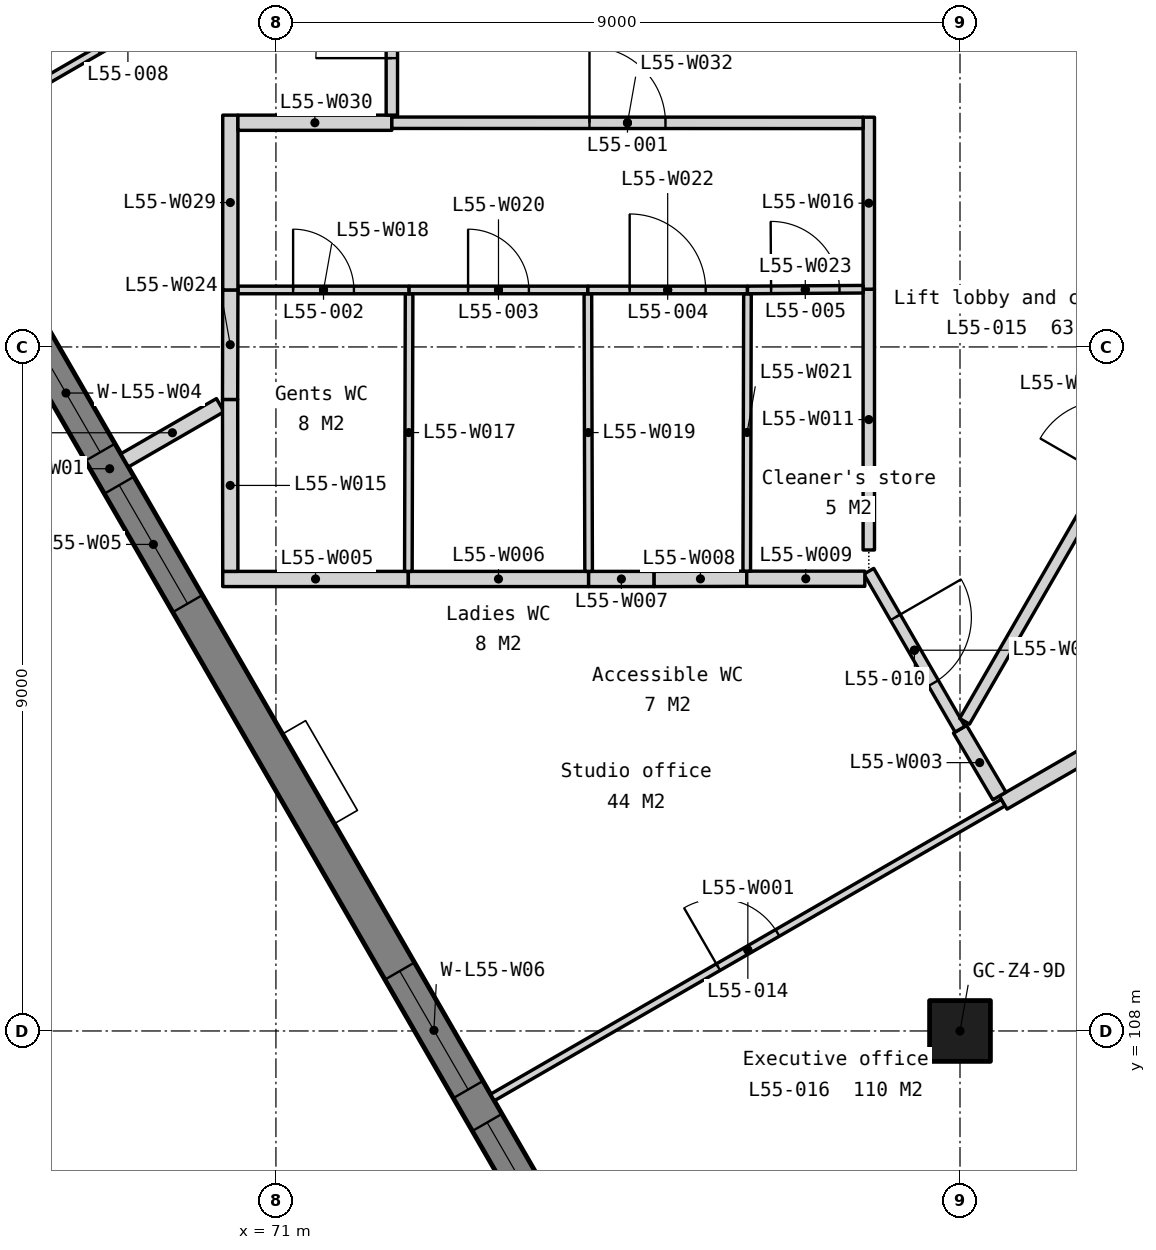
"""IFC4 building model, lengths in metres.
Left out: names, types, materials, properties, quantities, classifications, styles, units other than length and angle.
Written with IfcOpenShell. Run it as: python <this file> out.ifc"""

import sys

from ifc_helpers import new_model, si_unit, direction, frame, frame_2d, origin, origin_2d, place, context, subcontext, project, spatial, polyline, rectangle, outline, extrude, element, fill, save


model = new_model("IFC4")
c1 = context("Model", 3, precision=1e-05, world=origin(), true_north=direction((0.0, 1.0)))
c2 = subcontext(c1, "Body", "Model", "MODEL_VIEW")
j1 = project(units=[si_unit("LENGTHUNIT", "METRE"), si_unit("PLANEANGLEUNIT", "RADIAN")], contexts=[c1])
p1 = place(None, origin())
s1 = spatial("IfcSite", under=j1, at=p1, CompositionType="ELEMENT")
p2 = place(p1, origin())
s2 = spatial("IfcBuilding", under=s1, at=p2, CompositionType="ELEMENT")
p3 = place(p2, frame((0.0, 0.0, 219.2)))
s3 = spatial("IfcBuildingStorey", under=s2, at=p3, CompositionType="ELEMENT", Elevation=219.2)
p4 = place(p3, frame((80.0, 108.0, 0.0), z_axis=(0.0, 0.0, 1.0), x_axis=(1.0, 0.0, 0.0)))
e1 = element("IfcColumn", 1, at=p4, inside=s3, PredefinedType="COLUMN", context=c2, shape_type="SweptSolid", body=[
    extrude(rectangle(XDim=0.8, YDim=0.8, at=origin_2d()), origin(), (0.0, 0.0, 1.0), 3.9),
])
p5 = place(p3, frame((59.13, 132.168, -0.15), z_axis=(0.0, 0.0, 1.0), x_axis=(0.500002199942, -0.866024133644, 0.0)))
e2 = element("IfcWall", 2, at=p5, inside=s3, PredefinedType="SOLIDWALL", context=c2, shape_type="SweptSolid", body=[
    extrude(outline(polyline([(38.729, 0.0), (38.729, 3.9), (0.0, 3.9), (0.0, 0.0), (38.729, 0.0)])), frame((0.0, 0.225, 0.0), z_axis=(0.0, -1.0, 0.0), x_axis=(1.0, 0.0, 0.0)), (0.0, 0.0, 1.0), 0.45),
])
p6 = place(p5, frame((0.807, 0.0, 0.95)))
e3 = element("IfcOpeningElement", 3, at=p6, cuts=e2, PredefinedType="OPENING", context=c2, shape_type="SweptSolid", body=[
    extrude(rectangle(XDim=1.2, YDim=2.2, at=frame_2d((0.6, 1.1))), frame((0.0, 0.235, 0.0), z_axis=(0.0, -1.0, 0.0), x_axis=(1.0, 0.0, 0.0)), (0.0, 0.0, 1.0), 0.47),
])
p7 = place(p5, frame((7.632, 0.0, 0.95)))
e4 = element("IfcOpeningElement", 4, at=p7, cuts=e2, PredefinedType="OPENING", context=c2, shape_type="SweptSolid", body=[
    extrude(rectangle(XDim=1.8, YDim=2.2, at=frame_2d((0.9, 1.1))), frame((0.0, 0.235, 0.0), z_axis=(0.0, -1.0, 0.0), x_axis=(1.0, 0.0, 0.0)), (0.0, 0.0, 1.0), 0.47),
])
p8 = place(p5, frame((9.932, 0.0, 0.95)))
e5 = element("IfcOpeningElement", 5, at=p8, cuts=e2, PredefinedType="OPENING", context=c2, shape_type="SweptSolid", body=[
    extrude(rectangle(XDim=1.8, YDim=2.2, at=frame_2d((0.9, 1.1))), frame((0.0, 0.235, 0.0), z_axis=(0.0, -1.0, 0.0), x_axis=(1.0, 0.0, 0.0)), (0.0, 0.0, 1.0), 0.47),
])
p9 = place(p5, frame((17.315, 0.0, 0.95)))
e6 = element("IfcOpeningElement", 6, at=p9, cuts=e2, PredefinedType="OPENING", context=c2, shape_type="SweptSolid", body=[
    extrude(rectangle(XDim=1.8, YDim=2.2, at=frame_2d((0.9, 1.1))), frame((0.0, 0.235, 0.0), z_axis=(0.0, -1.0, 0.0), x_axis=(1.0, 0.0, 0.0)), (0.0, 0.0, 1.0), 0.47),
])
p10 = place(p5, frame((19.615, 0.0, 0.95)))
e7 = element("IfcOpeningElement", 7, at=p10, cuts=e2, PredefinedType="OPENING", context=c2, shape_type="SweptSolid", body=[
    extrude(rectangle(XDim=1.8, YDim=2.2, at=frame_2d((0.9, 1.1))), frame((0.0, 0.235, 0.0), z_axis=(0.0, -1.0, 0.0), x_axis=(1.0, 0.0, 0.0)), (0.0, 0.0, 1.0), 0.47),
])
p11 = place(p5, frame((26.997, 0.0, 0.95)))
e8 = element("IfcOpeningElement", 8, at=p11, cuts=e2, PredefinedType="OPENING", context=c2, shape_type="SweptSolid", body=[
    extrude(rectangle(XDim=1.8, YDim=2.2, at=frame_2d((0.9, 1.1))), frame((0.0, 0.235, 0.0), z_axis=(0.0, -1.0, 0.0), x_axis=(1.0, 0.0, 0.0)), (0.0, 0.0, 1.0), 0.47),
])
p12 = place(p5, frame((29.297, 0.0, 0.95)))
e9 = element("IfcOpeningElement", 9, at=p12, cuts=e2, PredefinedType="OPENING", context=c2, shape_type="SweptSolid", body=[
    extrude(rectangle(XDim=1.8, YDim=2.2, at=frame_2d((0.9, 1.1))), frame((0.0, 0.235, 0.0), z_axis=(0.0, -1.0, 0.0), x_axis=(1.0, 0.0, 0.0)), (0.0, 0.0, 1.0), 0.47),
])
p13 = place(p5, frame((36.722, 0.0, 0.95)))
e10 = element("IfcOpeningElement", 10, at=p13, cuts=e2, PredefinedType="OPENING", context=c2, shape_type="SweptSolid", body=[
    extrude(rectangle(XDim=1.2, YDim=2.2, at=frame_2d((0.6, 1.1))), frame((0.0, 0.235, 0.0), z_axis=(0.0, -1.0, 0.0), x_axis=(1.0, 0.0, 0.0)), (0.0, 0.0, 1.0), 0.47),
])
p14 = place(p3, frame((73.849, 107.125, 0.0), z_axis=(0.0, 0.0, 1.0), x_axis=(0.866027358884, 0.499996613652, 0.0)))
e11 = element("IfcWall", 11, at=p14, inside=s3, PredefinedType="PARTITIONING", context=c2, shape_type="SweptSolid", body=[
    extrude(rectangle(XDim=7.76, YDim=0.1, at=frame_2d((3.88, 0.0))), origin(), (0.0, 0.0, 1.0), 3.75),
])
p15 = place(p14, frame((3.43, 0.0, 0.0)))
e12 = element("IfcOpeningElement", 12, at=p15, cuts=e11, PredefinedType="OPENING", context=c2, shape_type="SweptSolid", body=[
    extrude(rectangle(XDim=0.9, YDim=2.1, at=frame_2d((0.45, 1.05))), frame((0.0, 0.06, 0.0), z_axis=(0.0, -1.0, 0.0), x_axis=(1.0, 0.0, 0.0)), (0.0, 0.0, 1.0), 0.12),
])
p16 = place(p3, frame((80.569, 111.005, 0.0), z_axis=(0.0, 0.0, 1.0), x_axis=(0.866025130863, 0.500000472714, 0.0)))
e13 = element("IfcWall", 13, at=p16, inside=s3, PredefinedType="PARTITIONING", context=c2, shape_type="SweptSolid", body=[
    extrude(rectangle(XDim=10.363, YDim=0.2, at=frame_2d((5.182, 0.0))), origin(), (0.0, 0.0, 1.0), 3.75),
])
p17 = place(p3, frame((80.0, 111.97, 0.0), z_axis=(0.0, 0.0, 1.0), x_axis=(0.507689136561, -0.861540330233, 0.0)))
e14 = element("IfcWall", 14, at=p17, inside=s3, PredefinedType="PARTITIONING", context=c2, shape_type="SweptSolid", body=[
    extrude(rectangle(XDim=1.021, YDim=0.2, at=frame_2d((0.51, 0.0))), origin(), (0.0, 0.0, 1.0), 3.75),
])
p18 = place(p3, frame((78.8, 114.049, 0.0), z_axis=(0.0, 0.0, 1.0), x_axis=(0.500001309137, -0.866024647952, 0.0)))
e15 = element("IfcWall", 15, at=p18, inside=s3, PredefinedType="PARTITIONING", context=c2, shape_type="SweptSolid", body=[
    extrude(rectangle(XDim=2.4, YDim=0.15, at=frame_2d((1.2, 0.0))), origin(), (0.0, 0.0, 1.0), 3.75),
])
p19 = place(p18, frame((0.7, 0.0, 0.0)))
e16 = element("IfcOpeningElement", 16, at=p19, cuts=e15, PredefinedType="OPENING", context=c2, shape_type="SweptSolid", body=[
    extrude(rectangle(XDim=1.0, YDim=2.1, at=frame_2d((0.5, 1.05))), frame((0.0, 0.085, 0.0), z_axis=(0.0, -1.0, 0.0), x_axis=(1.0, 0.0, 0.0)), (0.0, 0.0, 1.0), 0.17),
])
p20 = place(p3, frame((70.3, 113.947, 0.0), z_axis=(0.0, 0.0, 1.0), x_axis=(1.0, 0.0, 0.0)))
e17 = element("IfcWall", 17, at=p20, inside=s3, PredefinedType="PARTITIONING", context=c2, shape_type="SweptSolid", body=[
    extrude(rectangle(XDim=2.442, YDim=0.2, at=frame_2d((1.221, 0.0))), origin(), (0.0, 0.0, 1.0), 3.75),
])
p21 = place(p3, frame((72.742, 113.947, 0.0), z_axis=(0.0, 0.0, 1.0), x_axis=(1.0, 0.0, 0.0)))
e18 = element("IfcWall", 18, at=p21, inside=s3, PredefinedType="PARTITIONING", context=c2, shape_type="SweptSolid", body=[
    extrude(rectangle(XDim=2.372, YDim=0.2, at=frame_2d((1.186, 0.0))), origin(), (0.0, 0.0, 1.0), 3.75),
])
p22 = place(p3, frame((75.114, 113.947, 0.0), z_axis=(0.0, 0.0, 1.0), x_axis=(1.0, 0.0, 0.0)))
e19 = element("IfcWall", 19, at=p22, inside=s3, PredefinedType="PARTITIONING", context=c2, shape_type="SweptSolid", body=[
    extrude(rectangle(XDim=0.862, YDim=0.2, at=frame_2d((0.431, 0.0))), origin(), (0.0, 0.0, 1.0), 3.75),
])
p23 = place(p3, frame((75.976, 113.947, 0.0), z_axis=(0.0, 0.0, 1.0), x_axis=(0.999997107299, 0.002405284684, 0.0)))
e20 = element("IfcWall", 20, at=p23, inside=s3, PredefinedType="PARTITIONING", context=c2, shape_type="SweptSolid", body=[
    extrude(rectangle(XDim=1.218, YDim=0.2, at=frame_2d((0.609, 0.0))), origin(), (0.0, 0.0, 1.0), 3.75),
])
p24 = place(p3, frame((77.194, 113.95, 0.0), z_axis=(0.0, 0.0, 1.0), x_axis=(1.0, 0.0, 0.0)))
e21 = element("IfcWall", 21, at=p24, inside=s3, PredefinedType="PARTITIONING", context=c2, shape_type="SweptSolid", body=[
    extrude(rectangle(XDim=1.554, YDim=0.2, at=frame_2d((0.777, 0.0))), origin(), (0.0, 0.0, 1.0), 3.75),
])
p25 = place(p3, frame((78.8, 114.329, 0.0), z_axis=(0.0, 0.0, 1.0), x_axis=(0.0, 1.0, 0.0)))
e22 = element("IfcWall", 22, at=p25, inside=s3, PredefinedType="PARTITIONING", context=c2, shape_type="SweptSolid", body=[
    extrude(rectangle(XDim=3.431, YDim=0.15, at=frame_2d((1.716, 0.0))), origin(), (0.0, 0.0, 1.0), 3.75),
])
p26 = place(p3, frame((69.009, 115.508, 0.0), z_axis=(0.0, 0.0, 1.0), x_axis=(0.865958882005, 0.500115201406, 0.0)))
e23 = element("IfcWall", 23, at=p26, inside=s3, PredefinedType="PARTITIONING", context=c2, shape_type="SweptSolid", body=[
    extrude(rectangle(XDim=1.453, YDim=0.2, at=frame_2d((0.727, 0.0))), origin(), (0.0, 0.0, 1.0), 3.75),
])
p27 = place(p3, frame((70.4, 114.047, 0.0), z_axis=(0.0, 0.0, 1.0), x_axis=(-0.001295195892, 0.999999161233, 0.0)))
e24 = element("IfcWall", 24, at=p27, inside=s3, PredefinedType="PARTITIONING", context=c2, shape_type="SweptSolid", body=[
    extrude(rectangle(XDim=2.262, YDim=0.2, at=frame_2d((1.131, 0.0))), origin(), (0.0, 0.0, 1.0), 3.75),
])
p28 = place(p3, frame((78.8, 117.76, 0.0), z_axis=(0.0, 0.0, 1.0), x_axis=(0.0, 1.0, 0.0)))
e25 = element("IfcWall", 25, at=p28, inside=s3, PredefinedType="PARTITIONING", context=c2, shape_type="SweptSolid", body=[
    extrude(rectangle(XDim=2.263, YDim=0.15, at=frame_2d((1.131, 0.0))), origin(), (0.0, 0.0, 1.0), 3.75),
])
p29 = place(p3, frame((72.742, 114.047, 0.0), z_axis=(0.0, 0.0, 1.0), x_axis=(0.002673429826, 0.99999642638, 0.0)))
e26 = element("IfcWall", 26, at=p29, inside=s3, PredefinedType="PARTITIONING", context=c2, shape_type="SweptSolid", body=[
    extrude(rectangle(XDim=3.653, YDim=0.1, at=frame_2d((1.826, 0.0))), origin(), (0.0, 0.0, 1.0), 3.75),
])
p30 = place(p3, frame((70.5, 117.75, 0.0), z_axis=(0.0, 0.0, 1.0), x_axis=(1.0, 0.0, 0.0)))
e27 = element("IfcWall", 27, at=p30, inside=s3, PredefinedType="PARTITIONING", context=c2, shape_type="SweptSolid", body=[
    extrude(rectangle(XDim=2.252, YDim=0.1, at=frame_2d((1.126, 0.0))), origin(), (0.0, 0.0, 1.0), 3.75),
])
p31 = place(p30, frame((0.726, 0.0, 0.0)))
e28 = element("IfcOpeningElement", 28, at=p31, cuts=e27, PredefinedType="OPENING", context=c2, shape_type="SweptSolid", body=[
    extrude(rectangle(XDim=0.8, YDim=2.1, at=frame_2d((0.4, 1.05))), frame((0.0, 0.06, 0.0), z_axis=(0.0, -1.0, 0.0), x_axis=(1.0, 0.0, 0.0)), (0.0, 0.0, 1.0), 0.12),
])
p32 = place(p3, frame((75.114, 114.047, 0.0), z_axis=(0.0, 0.0, 1.0), x_axis=(-0.00260659454, 0.999996602827, 0.0)))
e29 = element("IfcWall", 29, at=p32, inside=s3, PredefinedType="PARTITIONING", context=c2, shape_type="SweptSolid", body=[
    extrude(rectangle(XDim=3.653, YDim=0.1, at=frame_2d((1.826, 0.0))), origin(), (0.0, 0.0, 1.0), 3.75),
])
p33 = place(p3, frame((72.752, 117.75, 0.0), z_axis=(0.0, 0.0, 1.0), x_axis=(1.0, 0.0, 0.0)))
e30 = element("IfcWall", 30, at=p33, inside=s3, PredefinedType="PARTITIONING", context=c2, shape_type="SweptSolid", body=[
    extrude(rectangle(XDim=2.352, YDim=0.1, at=frame_2d((1.176, 0.0))), origin(), (0.0, 0.0, 1.0), 3.75),
])
p34 = place(p33, frame((0.776, 0.0, 0.0)))
e31 = element("IfcOpeningElement", 31, at=p34, cuts=e30, PredefinedType="OPENING", context=c2, shape_type="SweptSolid", body=[
    extrude(rectangle(XDim=0.8, YDim=2.1, at=frame_2d((0.4, 1.05))), frame((0.0, 0.06, 0.0), z_axis=(0.0, -1.0, 0.0), x_axis=(1.0, 0.0, 0.0)), (0.0, 0.0, 1.0), 0.12),
])
p35 = place(p3, frame((77.194, 114.05, 0.0), z_axis=(0.0, 0.0, 1.0), x_axis=(0.002608686776, 0.999996597371, 0.0)))
e32 = element("IfcWall", 32, at=p35, inside=s3, PredefinedType="PARTITIONING", context=c2, shape_type="SweptSolid", body=[
    extrude(rectangle(XDim=3.65, YDim=0.1, at=frame_2d((1.825, 0.0))), origin(), (0.0, 0.0, 1.0), 3.75),
])
p36 = place(p3, frame((75.104, 117.75, 0.0), z_axis=(0.0, 0.0, 1.0), x_axis=(1.0, 0.0, 0.0)))
e33 = element("IfcWall", 33, at=p36, inside=s3, PredefinedType="PARTITIONING", context=c2, shape_type="SweptSolid", body=[
    extrude(rectangle(XDim=2.1, YDim=0.1, at=frame_2d((1.05, 0.0))), origin(), (0.0, 0.0, 1.0), 3.75),
])
p37 = place(p36, frame((0.55, 0.0, 0.0)))
e34 = element("IfcOpeningElement", 34, at=p37, cuts=e33, PredefinedType="OPENING", context=c2, shape_type="SweptSolid", body=[
    extrude(rectangle(XDim=1.0, YDim=2.1, at=frame_2d((0.5, 1.05))), frame((0.0, 0.06, 0.0), z_axis=(0.0, -1.0, 0.0), x_axis=(1.0, 0.0, 0.0)), (0.0, 0.0, 1.0), 0.12),
])
p38 = place(p3, frame((77.204, 117.75, 0.0), z_axis=(0.0, 0.0, 1.0), x_axis=(0.999980406575, 0.006259909447, 0.0)))
e35 = element("IfcWall", 35, at=p38, inside=s3, PredefinedType="PARTITIONING", context=c2, shape_type="SweptSolid", body=[
    extrude(rectangle(XDim=1.521, YDim=0.1, at=frame_2d((0.76, 0.0))), origin(), (0.0, 0.0, 1.0), 3.75),
])
p39 = place(p38, frame((0.311, 0.0, 0.0)))
e36 = element("IfcOpeningElement", 36, at=p39, cuts=e35, PredefinedType="OPENING", context=c2, shape_type="SweptSolid", body=[
    extrude(rectangle(XDim=0.9, YDim=2.1, at=frame_2d((0.45, 1.05))), frame((0.0, 0.06, 0.0), z_axis=(0.0, -1.0, 0.0), x_axis=(1.0, 0.0, 0.0)), (0.0, 0.0, 1.0), 0.12),
])
p40 = place(p3, frame((70.397, 116.309, 0.0), z_axis=(0.0, 0.0, 1.0), x_axis=(0.002033204879, 0.999997933037, 0.0)))
e37 = element("IfcWall", 37, at=p40, inside=s3, PredefinedType="PARTITIONING", context=c2, shape_type="SweptSolid", body=[
    extrude(rectangle(XDim=1.441, YDim=0.2, at=frame_2d((0.72, 0.0))), origin(), (0.0, 0.0, 1.0), 3.75),
])
p41 = place(p3, frame((80.06, 112.074, 0.0), z_axis=(0.0, 0.0, 1.0), x_axis=(0.500005339912, 0.866022320763, 0.0)))
e38 = element("IfcWall", 38, at=p41, inside=s3, PredefinedType="PARTITIONING", context=c2, shape_type="SweptSolid", body=[
    extrude(rectangle(XDim=8.442, YDim=0.15, at=frame_2d((4.221, 0.0))), origin(), (0.0, 0.0, 1.0), 3.75),
])
p42 = place(p41, frame((3.721, 0.0, 0.0)))
e39 = element("IfcOpeningElement", 39, at=p42, cuts=e38, PredefinedType="OPENING", context=c2, shape_type="SweptSolid", body=[
    extrude(rectangle(XDim=1.0, YDim=2.1, at=frame_2d((0.5, 1.05))), frame((0.0, 0.085, 0.0), z_axis=(0.0, -1.0, 0.0), x_axis=(1.0, 0.0, 0.0)), (0.0, 0.0, 1.0), 0.17),
])
p43 = place(p3, frame((66.587, 119.703, 0.0), z_axis=(0.0, 0.0, 1.0), x_axis=(0.866023511746, 0.500003277092, 0.0)))
e40 = element("IfcWall", 40, at=p43, inside=s3, PredefinedType="PARTITIONING", context=c2, shape_type="SweptSolid", body=[
    extrude(rectangle(XDim=5.694, YDim=0.1, at=frame_2d((2.847, 0.0))), origin(), (0.0, 0.0, 1.0), 3.75),
])
p44 = place(p43, frame((2.397, 0.0, 0.0)))
e41 = element("IfcOpeningElement", 41, at=p44, cuts=e40, PredefinedType="OPENING", context=c2, shape_type="SweptSolid", body=[
    extrude(rectangle(XDim=0.9, YDim=2.1, at=frame_2d((0.45, 1.05))), frame((0.0, 0.06, 0.0), z_axis=(0.0, -1.0, 0.0), x_axis=(1.0, 0.0, 0.0)), (0.0, 0.0, 1.0), 0.12),
])
p45 = place(p3, frame((70.4, 117.75, 0.0), z_axis=(0.0, 0.0, 1.0), x_axis=(0.0, 1.0, 0.0)))
e42 = element("IfcWall", 42, at=p45, inside=s3, PredefinedType="PARTITIONING", context=c2, shape_type="SweptSolid", body=[
    extrude(rectangle(XDim=2.3, YDim=0.2, at=frame_2d((1.15, 0.0))), origin(), (0.0, 0.0, 1.0), 3.75),
])
p46 = place(p3, frame((70.5, 119.95, 0.0), z_axis=(0.0, 0.0, 1.0), x_axis=(1.0, 0.0, 0.0)))
e43 = element("IfcWall", 43, at=p46, inside=s3, PredefinedType="PARTITIONING", context=c2, shape_type="SweptSolid", body=[
    extrude(rectangle(XDim=2.025, YDim=0.2, at=frame_2d((1.012, 0.0))), origin(), (0.0, 0.0, 1.0), 3.75),
])
p47 = place(p3, frame((72.525, 120.05, 0.0), z_axis=(0.0, 0.0, 1.0), x_axis=(0.0, 1.0, 0.0)))
e44 = element("IfcWall", 44, at=p47, inside=s3, PredefinedType="PARTITIONING", context=c2, shape_type="SweptSolid", body=[
    extrude(rectangle(XDim=2.5, YDim=0.15, at=frame_2d((1.25, 0.0))), origin(), (0.0, 0.0, 1.0), 3.75),
])
p48 = place(p47, frame((0.75, 0.0, 0.0)))
e45 = element("IfcOpeningElement", 45, at=p48, cuts=e44, PredefinedType="OPENING", context=c2, shape_type="SweptSolid", body=[
    extrude(rectangle(XDim=1.0, YDim=2.1, at=frame_2d((0.5, 1.05))), frame((0.0, 0.085, 0.0), z_axis=(0.0, -1.0, 0.0), x_axis=(1.0, 0.0, 0.0)), (0.0, 0.0, 1.0), 0.17),
])
p49 = place(p3, frame((72.525, 119.95, 0.0), z_axis=(0.0, 0.0, 1.0), x_axis=(0.999999950384, -0.000315010222, 0.0)))
e46 = element("IfcWall", 46, at=p49, inside=s3, PredefinedType="PARTITIONING", context=c2, shape_type="SweptSolid", body=[
    extrude(rectangle(XDim=6.2, YDim=0.15, at=frame_2d((3.1, 0.0))), origin(), (0.0, 0.0, 1.0), 3.75),
])
p50 = place(p49, frame((2.6, 0.0, 0.0)))
e47 = element("IfcOpeningElement", 47, at=p50, cuts=e46, PredefinedType="OPENING", context=c2, shape_type="SweptSolid", body=[
    extrude(rectangle(XDim=1.0, YDim=2.1, at=frame_2d((0.5, 1.05))), frame((0.0, 0.085, 0.0), z_axis=(0.0, -1.0, 0.0), x_axis=(1.0, 0.0, 0.0)), (0.0, 0.0, 1.0), 0.17),
])
p51 = place(p9, origin())
e48 = element("IfcWindow", 48, at=p51, inside=s3, PartitioningType="SINGLE_PANEL", PredefinedType="WINDOW", context=c2, shape_type="SweptSolid", body=[
    extrude(rectangle(XDim=1.8, YDim=2.2, at=frame_2d((0.9, 1.1))), frame((0.0, 0.03, 0.0), z_axis=(0.0, -1.0, 0.0), x_axis=(1.0, 0.0, 0.0)), (0.0, 0.0, 1.0), 0.06),
])
fill(e6, e48)
p52 = place(p10, origin())
e49 = element("IfcWindow", 49, at=p52, inside=s3, PartitioningType="SINGLE_PANEL", PredefinedType="WINDOW", context=c2, shape_type="SweptSolid", body=[
    extrude(rectangle(XDim=1.8, YDim=2.2, at=frame_2d((0.9, 1.1))), frame((0.0, 0.03, 0.0), z_axis=(0.0, -1.0, 0.0), x_axis=(1.0, 0.0, 0.0)), (0.0, 0.0, 1.0), 0.06),
])
fill(e7, e49)
p53 = place(p11, origin())
e50 = element("IfcWindow", 50, at=p53, inside=s3, PartitioningType="SINGLE_PANEL", PredefinedType="WINDOW", context=c2, shape_type="SweptSolid", body=[
    extrude(rectangle(XDim=1.8, YDim=2.2, at=frame_2d((0.9, 1.1))), frame((0.0, 0.03, 0.0), z_axis=(0.0, -1.0, 0.0), x_axis=(1.0, 0.0, 0.0)), (0.0, 0.0, 1.0), 0.06),
])
fill(e8, e50)
p54 = place(p12, origin())
e51 = element("IfcWindow", 51, at=p54, inside=s3, PartitioningType="SINGLE_PANEL", PredefinedType="WINDOW", context=c2, shape_type="SweptSolid", body=[
    extrude(rectangle(XDim=1.8, YDim=2.2, at=frame_2d((0.9, 1.1))), frame((0.0, 0.03, 0.0), z_axis=(0.0, -1.0, 0.0), x_axis=(1.0, 0.0, 0.0)), (0.0, 0.0, 1.0), 0.06),
])
fill(e9, e51)
p55 = place(p50, origin())
e52 = element("IfcDoor", 52, at=p55, inside=s3, OperationType="SINGLE_SWING_LEFT", PredefinedType="DOOR", context=c2, shape_type="SweptSolid", body=[
    extrude(rectangle(XDim=1.0, YDim=2.1, at=frame_2d((0.5, 1.05))), frame((0.0, 0.025, 0.0), z_axis=(0.0, -1.0, 0.0), x_axis=(1.0, 0.0, 0.0)), (0.0, 0.0, 1.0), 0.05),
])
fill(e47, e52)
p56 = place(p31, origin())
e53 = element("IfcDoor", 53, at=p56, inside=s3, OperationType="SINGLE_SWING_LEFT", PredefinedType="DOOR", context=c2, shape_type="SweptSolid", body=[
    extrude(rectangle(XDim=0.8, YDim=2.1, at=frame_2d((0.4, 1.05))), frame((0.0, 0.025, 0.0), z_axis=(0.0, -1.0, 0.0), x_axis=(1.0, 0.0, 0.0)), (0.0, 0.0, 1.0), 0.05),
])
fill(e28, e53)
p57 = place(p34, origin())
e54 = element("IfcDoor", 54, at=p57, inside=s3, OperationType="SINGLE_SWING_LEFT", PredefinedType="DOOR", context=c2, shape_type="SweptSolid", body=[
    extrude(rectangle(XDim=0.8, YDim=2.1, at=frame_2d((0.4, 1.05))), frame((0.0, 0.025, 0.0), z_axis=(0.0, -1.0, 0.0), x_axis=(1.0, 0.0, 0.0)), (0.0, 0.0, 1.0), 0.05),
])
fill(e31, e54)
p58 = place(p37, origin())
e55 = element("IfcDoor", 55, at=p58, inside=s3, OperationType="SINGLE_SWING_LEFT", PredefinedType="DOOR", context=c2, shape_type="SweptSolid", body=[
    extrude(rectangle(XDim=1.0, YDim=2.1, at=frame_2d((0.5, 1.05))), frame((0.0, 0.025, 0.0), z_axis=(0.0, -1.0, 0.0), x_axis=(1.0, 0.0, 0.0)), (0.0, 0.0, 1.0), 0.05),
])
fill(e34, e55)
p59 = place(p39, origin())
e56 = element("IfcDoor", 56, at=p59, inside=s3, OperationType="SINGLE_SWING_LEFT", PredefinedType="DOOR", context=c2, shape_type="SweptSolid", body=[
    extrude(rectangle(XDim=0.9, YDim=2.1, at=frame_2d((0.45, 1.05))), frame((0.0, 0.025, 0.0), z_axis=(0.0, -1.0, 0.0), x_axis=(1.0, 0.0, 0.0)), (0.0, 0.0, 1.0), 0.05),
])
fill(e36, e56)
p60 = place(p48, origin())
e57 = element("IfcDoor", 57, at=p60, inside=s3, OperationType="SINGLE_SWING_LEFT", PredefinedType="DOOR", context=c2, shape_type="SweptSolid", body=[
    extrude(rectangle(XDim=1.0, YDim=2.1, at=frame_2d((0.5, 1.05))), frame((0.0, 0.025, 0.0), z_axis=(0.0, -1.0, 0.0), x_axis=(1.0, 0.0, 0.0)), (0.0, 0.0, 1.0), 0.05),
])
fill(e45, e57)
p61 = place(p19, origin())
e58 = element("IfcDoor", 58, at=p61, inside=s3, OperationType="SINGLE_SWING_LEFT", PredefinedType="DOOR", context=c2, shape_type="SweptSolid", body=[
    extrude(rectangle(XDim=1.0, YDim=2.1, at=frame_2d((0.5, 1.05))), frame((0.0, 0.025, 0.0), z_axis=(0.0, -1.0, 0.0), x_axis=(1.0, 0.0, 0.0)), (0.0, 0.0, 1.0), 0.05),
])
fill(e16, e58)
p62 = place(p15, origin())
e59 = element("IfcDoor", 59, at=p62, inside=s3, OperationType="SINGLE_SWING_LEFT", PredefinedType="DOOR", context=c2, shape_type="SweptSolid", body=[
    extrude(rectangle(XDim=0.9, YDim=2.1, at=frame_2d((0.45, 1.05))), frame((0.0, 0.025, 0.0), z_axis=(0.0, -1.0, 0.0), x_axis=(1.0, 0.0, 0.0)), (0.0, 0.0, 1.0), 0.05),
])
fill(e12, e59)
save(model, sys.argv[1])
